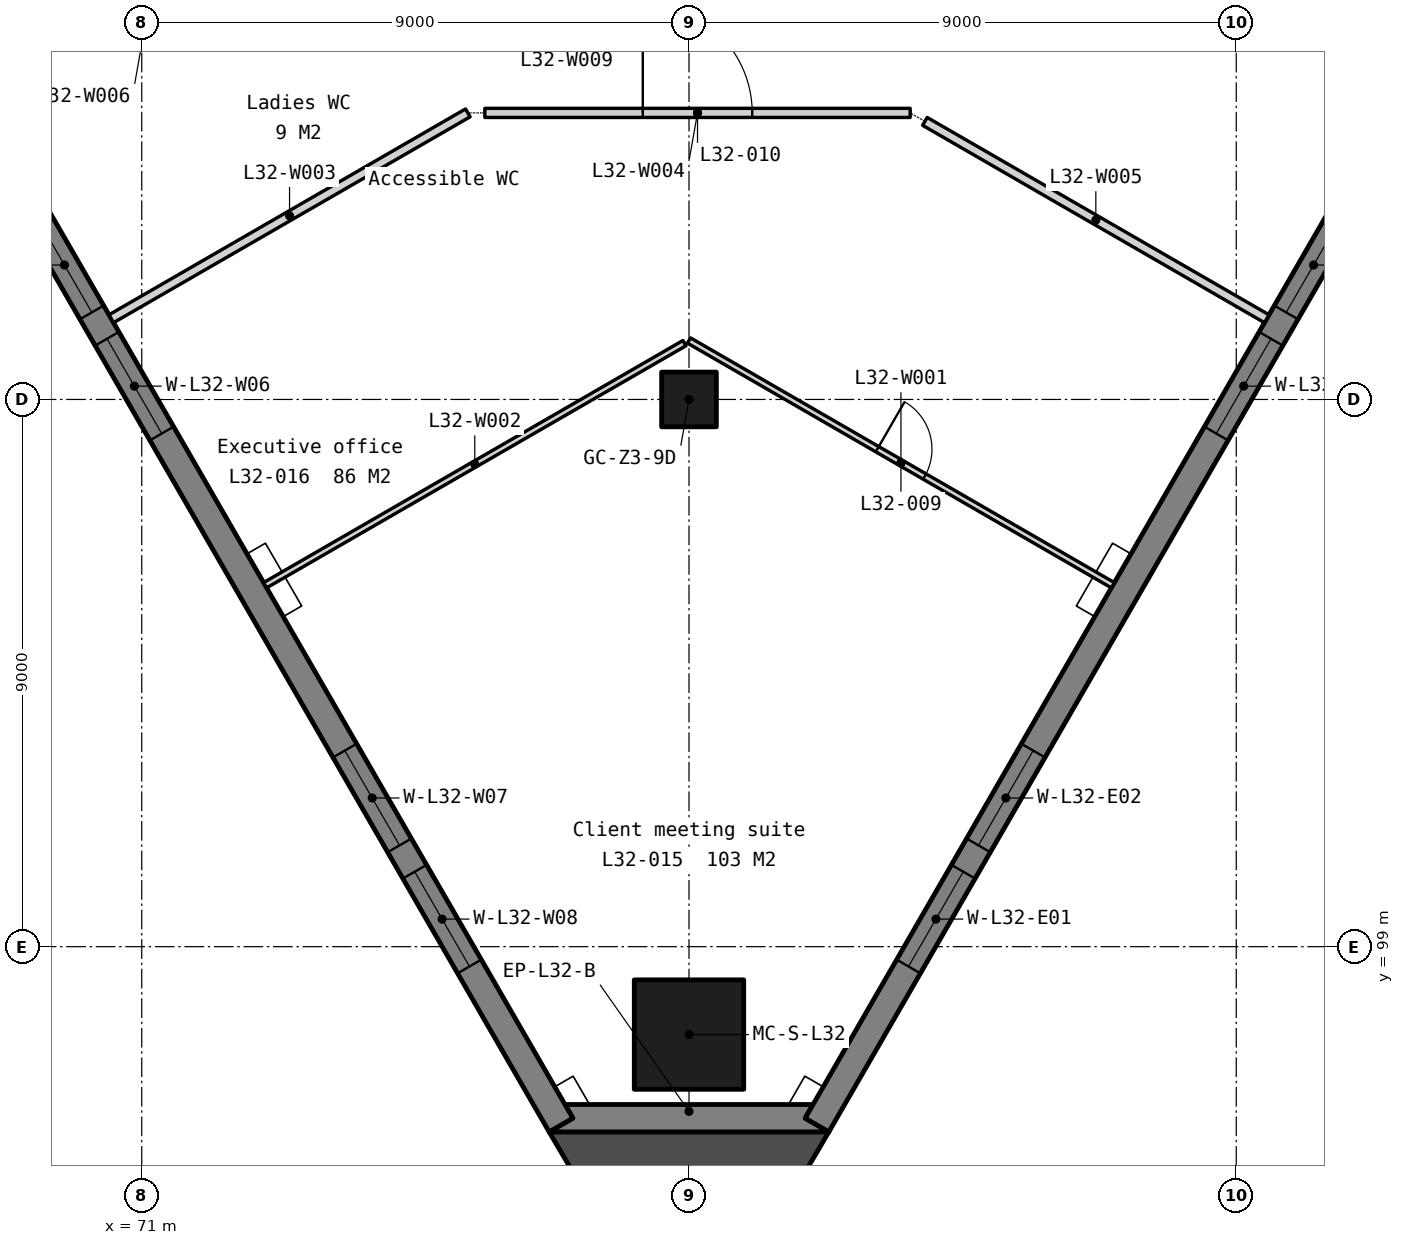
"""IFC4 building model, lengths in metres.
Left out: names, types, materials, properties, quantities, classifications, styles, units other than length and angle.
Written with IfcOpenShell. Run it as: python <this file> out.ifc"""

import sys

from ifc_helpers import new_model, si_unit, direction, frame, frame_2d, origin, origin_2d, place, context, subcontext, project, spatial, polyline, rectangle, outline, extrude, element, fill, save


model = new_model("IFC4")
c1 = context("Model", 3, precision=1e-05, world=origin(), true_north=direction((0.0, 1.0)))
c2 = subcontext(c1, "Body", "Model", "MODEL_VIEW")
j1 = project(units=[si_unit("LENGTHUNIT", "METRE"), si_unit("PLANEANGLEUNIT", "RADIAN")], contexts=[c1])
p1 = place(None, origin())
s1 = spatial("IfcSite", under=j1, at=p1, CompositionType="ELEMENT")
p2 = place(p1, origin())
s2 = spatial("IfcBuilding", under=s1, at=p2, CompositionType="ELEMENT")
p3 = place(p2, frame((0.0, 0.0, 128.6)))
s3 = spatial("IfcBuildingStorey", under=s2, at=p3, CompositionType="ELEMENT", Elevation=128.6)
p4 = place(p3, frame((80.0, 108.0, 0.0), z_axis=(0.0, 0.0, 1.0), x_axis=(1.0, 0.0, 0.0)))
e1 = element("IfcColumn", 1, at=p4, inside=s3, PredefinedType="COLUMN", context=c2, shape_type="SweptSolid", body=[
    extrude(rectangle(XDim=0.9, YDim=0.9, at=origin_2d()), origin(), (0.0, 0.0, 1.0), 3.9),
])
p5 = place(p3, frame((80.0, 97.554, 0.0), z_axis=(0.0, 0.0, 1.0), x_axis=(1.0, 0.0, 0.0)))
e2 = element("IfcColumn", 2, at=p5, inside=s3, PredefinedType="COLUMN", context=c2, shape_type="SweptSolid", body=[
    extrude(rectangle(XDim=1.8, YDim=1.8, at=origin_2d()), origin(), (0.0, 0.0, 1.0), 3.9),
])
p6 = place(p3, frame((0.0, 0.0, -0.45)))
e3 = element("IfcWall", 3, at=p6, inside=s3, PredefinedType="SOLIDWALL", context=c2, shape_type="SweptSolid", body=[
    extrude(outline(polyline([(77.7, 95.954), (78.09, 96.179), (77.96, 96.404), (82.04, 96.404), (81.91, 96.179), (82.3, 95.954), (77.7, 95.954)])), origin(), (0.0, 0.0, 1.0), 4.2),
])
p7 = place(p3, frame((57.652, 131.129, -0.45), z_axis=(0.0, 0.0, 1.0), x_axis=(0.499997369791, -0.866026922331, 0.0)))
e4 = element("IfcWall", 4, at=p7, inside=s3, PredefinedType="SOLIDWALL", context=c2, shape_type="SweptSolid", body=[
    extrude(outline(polyline([(40.486, 0.0), (40.486, 4.2), (0.0, 4.2), (0.0, 0.0), (40.486, 0.0)])), frame((0.0, 0.225, 0.0), z_axis=(0.0, -1.0, 0.0), x_axis=(1.0, 0.0, 0.0)), (0.0, 0.0, 1.0), 0.45),
])
p8 = place(p7, frame((3.011, 0.0, 1.25)))
e5 = element("IfcOpeningElement", 5, at=p8, cuts=e4, PredefinedType="OPENING", context=c2, shape_type="SweptSolid", body=[
    extrude(rectangle(XDim=1.8, YDim=2.2, at=frame_2d((0.9, 1.1))), frame((0.0, 0.235, 0.0), z_axis=(0.0, -1.0, 0.0), x_axis=(1.0, 0.0, 0.0)), (0.0, 0.0, 1.0), 0.47),
])
p9 = place(p7, frame((5.311, 0.0, 1.25)))
e6 = element("IfcOpeningElement", 6, at=p9, cuts=e4, PredefinedType="OPENING", context=c2, shape_type="SweptSolid", body=[
    extrude(rectangle(XDim=1.8, YDim=2.2, at=frame_2d((0.9, 1.1))), frame((0.0, 0.235, 0.0), z_axis=(0.0, -1.0, 0.0), x_axis=(1.0, 0.0, 0.0)), (0.0, 0.0, 1.0), 0.47),
])
p10 = place(p7, frame((13.132, 0.0, 1.25)))
e7 = element("IfcOpeningElement", 7, at=p10, cuts=e4, PredefinedType="OPENING", context=c2, shape_type="SweptSolid", body=[
    extrude(rectangle(XDim=1.8, YDim=2.2, at=frame_2d((0.9, 1.1))), frame((0.0, 0.235, 0.0), z_axis=(0.0, -1.0, 0.0), x_axis=(1.0, 0.0, 0.0)), (0.0, 0.0, 1.0), 0.47),
])
p11 = place(p7, frame((15.432, 0.0, 1.25)))
e8 = element("IfcOpeningElement", 8, at=p11, cuts=e4, PredefinedType="OPENING", context=c2, shape_type="SweptSolid", body=[
    extrude(rectangle(XDim=1.8, YDim=2.2, at=frame_2d((0.9, 1.1))), frame((0.0, 0.235, 0.0), z_axis=(0.0, -1.0, 0.0), x_axis=(1.0, 0.0, 0.0)), (0.0, 0.0, 1.0), 0.47),
])
p12 = place(p7, frame((23.254, 0.0, 1.25)))
e9 = element("IfcOpeningElement", 9, at=p12, cuts=e4, PredefinedType="OPENING", context=c2, shape_type="SweptSolid", body=[
    extrude(rectangle(XDim=1.8, YDim=2.2, at=frame_2d((0.9, 1.1))), frame((0.0, 0.235, 0.0), z_axis=(0.0, -1.0, 0.0), x_axis=(1.0, 0.0, 0.0)), (0.0, 0.0, 1.0), 0.47),
])
p13 = place(p7, frame((25.554, 0.0, 1.25)))
e10 = element("IfcOpeningElement", 10, at=p13, cuts=e4, PredefinedType="OPENING", context=c2, shape_type="SweptSolid", body=[
    extrude(rectangle(XDim=1.8, YDim=2.2, at=frame_2d((0.9, 1.1))), frame((0.0, 0.235, 0.0), z_axis=(0.0, -1.0, 0.0), x_axis=(1.0, 0.0, 0.0)), (0.0, 0.0, 1.0), 0.47),
])
p14 = place(p7, frame((33.375, 0.0, 1.25)))
e11 = element("IfcOpeningElement", 11, at=p14, cuts=e4, PredefinedType="OPENING", context=c2, shape_type="SweptSolid", body=[
    extrude(rectangle(XDim=1.8, YDim=2.2, at=frame_2d((0.9, 1.1))), frame((0.0, 0.235, 0.0), z_axis=(0.0, -1.0, 0.0), x_axis=(1.0, 0.0, 0.0)), (0.0, 0.0, 1.0), 0.47),
])
p15 = place(p7, frame((35.675, 0.0, 1.25)))
e12 = element("IfcOpeningElement", 12, at=p15, cuts=e4, PredefinedType="OPENING", context=c2, shape_type="SweptSolid", body=[
    extrude(rectangle(XDim=1.8, YDim=2.2, at=frame_2d((0.9, 1.1))), frame((0.0, 0.235, 0.0), z_axis=(0.0, -1.0, 0.0), x_axis=(1.0, 0.0, 0.0)), (0.0, 0.0, 1.0), 0.47),
])
p16 = place(p3, frame((82.105, 96.067, -0.45), z_axis=(0.0, 0.0, 1.0), x_axis=(0.499997369791, 0.866026922331, 0.0)))
e13 = element("IfcWall", 13, at=p16, inside=s3, PredefinedType="SOLIDWALL", context=c2, shape_type="SweptSolid", body=[
    extrude(outline(polyline([(40.486, 0.0), (40.486, 4.2), (0.0, 4.2), (0.0, 0.0), (40.486, 0.0)])), frame((0.0, 0.225, 0.0), z_axis=(0.0, -1.0, 0.0), x_axis=(1.0, 0.0, 0.0)), (0.0, 0.0, 1.0), 0.45),
])
p17 = place(p16, frame((3.011, 0.0, 1.25)))
e14 = element("IfcOpeningElement", 14, at=p17, cuts=e13, PredefinedType="OPENING", context=c2, shape_type="SweptSolid", body=[
    extrude(rectangle(XDim=1.8, YDim=2.2, at=frame_2d((0.9, 1.1))), frame((0.0, 0.235, 0.0), z_axis=(0.0, -1.0, 0.0), x_axis=(1.0, 0.0, 0.0)), (0.0, 0.0, 1.0), 0.47),
])
p18 = place(p16, frame((5.311, 0.0, 1.25)))
e15 = element("IfcOpeningElement", 15, at=p18, cuts=e13, PredefinedType="OPENING", context=c2, shape_type="SweptSolid", body=[
    extrude(rectangle(XDim=1.8, YDim=2.2, at=frame_2d((0.9, 1.1))), frame((0.0, 0.235, 0.0), z_axis=(0.0, -1.0, 0.0), x_axis=(1.0, 0.0, 0.0)), (0.0, 0.0, 1.0), 0.47),
])
p19 = place(p16, frame((13.132, 0.0, 1.25)))
e16 = element("IfcOpeningElement", 16, at=p19, cuts=e13, PredefinedType="OPENING", context=c2, shape_type="SweptSolid", body=[
    extrude(rectangle(XDim=1.8, YDim=2.2, at=frame_2d((0.9, 1.1))), frame((0.0, 0.235, 0.0), z_axis=(0.0, -1.0, 0.0), x_axis=(1.0, 0.0, 0.0)), (0.0, 0.0, 1.0), 0.47),
])
p20 = place(p16, frame((15.432, 0.0, 1.25)))
e17 = element("IfcOpeningElement", 17, at=p20, cuts=e13, PredefinedType="OPENING", context=c2, shape_type="SweptSolid", body=[
    extrude(rectangle(XDim=1.8, YDim=2.2, at=frame_2d((0.9, 1.1))), frame((0.0, 0.235, 0.0), z_axis=(0.0, -1.0, 0.0), x_axis=(1.0, 0.0, 0.0)), (0.0, 0.0, 1.0), 0.47),
])
p21 = place(p16, frame((23.254, 0.0, 1.25)))
e18 = element("IfcOpeningElement", 18, at=p21, cuts=e13, PredefinedType="OPENING", context=c2, shape_type="SweptSolid", body=[
    extrude(rectangle(XDim=1.8, YDim=2.2, at=frame_2d((0.9, 1.1))), frame((0.0, 0.235, 0.0), z_axis=(0.0, -1.0, 0.0), x_axis=(1.0, 0.0, 0.0)), (0.0, 0.0, 1.0), 0.47),
])
p22 = place(p16, frame((25.554, 0.0, 1.25)))
e19 = element("IfcOpeningElement", 19, at=p22, cuts=e13, PredefinedType="OPENING", context=c2, shape_type="SweptSolid", body=[
    extrude(rectangle(XDim=1.8, YDim=2.2, at=frame_2d((0.9, 1.1))), frame((0.0, 0.235, 0.0), z_axis=(0.0, -1.0, 0.0), x_axis=(1.0, 0.0, 0.0)), (0.0, 0.0, 1.0), 0.47),
])
p23 = place(p16, frame((33.375, 0.0, 1.25)))
e20 = element("IfcOpeningElement", 20, at=p23, cuts=e13, PredefinedType="OPENING", context=c2, shape_type="SweptSolid", body=[
    extrude(rectangle(XDim=1.8, YDim=2.2, at=frame_2d((0.9, 1.1))), frame((0.0, 0.235, 0.0), z_axis=(0.0, -1.0, 0.0), x_axis=(1.0, 0.0, 0.0)), (0.0, 0.0, 1.0), 0.47),
])
p24 = place(p16, frame((35.675, 0.0, 1.25)))
e21 = element("IfcOpeningElement", 21, at=p24, cuts=e13, PredefinedType="OPENING", context=c2, shape_type="SweptSolid", body=[
    extrude(rectangle(XDim=1.8, YDim=2.2, at=frame_2d((0.9, 1.1))), frame((0.0, 0.235, 0.0), z_axis=(0.0, -1.0, 0.0), x_axis=(1.0, 0.0, 0.0)), (0.0, 0.0, 1.0), 0.47),
])
p25 = place(p3, frame((0.0, 0.0, -0.45)))
e22 = element("IfcWall", 22, at=p25, inside=s3, PredefinedType="SOLIDWALL", context=c2, shape_type="SweptSolid", body=[
    extrude(outline(polyline([(77.7, 95.954), (80.0, 92.051), (82.3, 95.954), (77.7, 95.954)])), origin(), (0.0, 0.0, 1.0), 4.2),
])
p26 = place(p3, frame((80.0, 108.969, 0.0), z_axis=(0.0, 0.0, 1.0), x_axis=(0.86602648383, -0.499998129301, 0.0)))
e23 = element("IfcWall", 23, at=p26, inside=s3, PredefinedType="PARTITIONING", context=c2, shape_type="SweptSolid", body=[
    extrude(rectangle(XDim=8.049, YDim=0.1, at=frame_2d((4.025, 0.0))), origin(), (0.0, 0.0, 1.0), 3.75),
])
p27 = place(p26, frame((3.575, 0.0, 0.0)))
e24 = element("IfcOpeningElement", 24, at=p27, cuts=e23, PredefinedType="OPENING", context=c2, shape_type="SweptSolid", body=[
    extrude(rectangle(XDim=0.9, YDim=2.1, at=frame_2d((0.45, 1.05))), frame((0.0, 0.06, 0.0), z_axis=(0.0, -1.0, 0.0), x_axis=(1.0, 0.0, 0.0)), (0.0, 0.0, 1.0), 0.12),
])
p28 = place(p3, frame((73.029, 104.945, 0.0), z_axis=(0.0, 0.0, 1.0), x_axis=(0.866023222546, 0.500003777996, 0.0)))
e25 = element("IfcWall", 25, at=p28, inside=s3, PredefinedType="PARTITIONING", context=c2, shape_type="SweptSolid", body=[
    extrude(rectangle(XDim=7.963, YDim=0.1, at=frame_2d((3.981, 0.0))), origin(), (0.0, 0.0, 1.0), 3.75),
])
p29 = place(p3, frame((70.499, 109.327, 0.0), z_axis=(0.0, 0.0, 1.0), x_axis=(0.866024677295, 0.500001258315, 0.0)))
e26 = element("IfcWall", 26, at=p29, inside=s3, PredefinedType="PARTITIONING", context=c2, shape_type="SweptSolid", body=[
    extrude(rectangle(XDim=6.771, YDim=0.15, at=frame_2d((3.386, 0.0))), origin(), (0.0, 0.0, 1.0), 3.75),
])
p30 = place(p3, frame((76.643, 112.713, 0.0), z_axis=(0.0, 0.0, 1.0), x_axis=(1.0, 0.0, 0.0)))
e27 = element("IfcWall", 27, at=p30, inside=s3, PredefinedType="PARTITIONING", context=c2, shape_type="SweptSolid", body=[
    extrude(rectangle(XDim=6.995, YDim=0.15, at=frame_2d((3.497, 0.0))), origin(), (0.0, 0.0, 1.0), 3.75),
])
p31 = place(p30, frame((2.597, 0.0, 0.0)))
e28 = element("IfcOpeningElement", 28, at=p31, cuts=e27, PredefinedType="OPENING", context=c2, shape_type="SweptSolid", body=[
    extrude(rectangle(XDim=1.8, YDim=2.1, at=frame_2d((0.9, 1.05))), frame((0.0, 0.085, 0.0), z_axis=(0.0, -1.0, 0.0), x_axis=(1.0, 0.0, 0.0)), (0.0, 0.0, 1.0), 0.17),
])
p32 = place(p3, frame((83.88, 112.573, 0.0), z_axis=(0.0, 0.0, 1.0), x_axis=(0.866019616786, -0.500010023241, 0.0)))
e29 = element("IfcWall", 29, at=p32, inside=s3, PredefinedType="PARTITIONING", context=c2, shape_type="SweptSolid", body=[
    extrude(rectangle(XDim=6.491, YDim=0.15, at=frame_2d((3.246, 0.0))), origin(), (0.0, 0.0, 1.0), 3.75),
])
p33 = place(p12, origin())
e30 = element("IfcWindow", 30, at=p33, inside=s3, PartitioningType="SINGLE_PANEL", PredefinedType="WINDOW", context=c2, shape_type="SweptSolid", body=[
    extrude(rectangle(XDim=1.8, YDim=2.2, at=frame_2d((0.9, 1.1))), frame((0.0, 0.03, 0.0), z_axis=(0.0, -1.0, 0.0), x_axis=(1.0, 0.0, 0.0)), (0.0, 0.0, 1.0), 0.06),
])
fill(e9, e30)
p34 = place(p13, origin())
e31 = element("IfcWindow", 31, at=p34, inside=s3, PartitioningType="SINGLE_PANEL", PredefinedType="WINDOW", context=c2, shape_type="SweptSolid", body=[
    extrude(rectangle(XDim=1.8, YDim=2.2, at=frame_2d((0.9, 1.1))), frame((0.0, 0.03, 0.0), z_axis=(0.0, -1.0, 0.0), x_axis=(1.0, 0.0, 0.0)), (0.0, 0.0, 1.0), 0.06),
])
fill(e10, e31)
p35 = place(p14, origin())
e32 = element("IfcWindow", 32, at=p35, inside=s3, PartitioningType="SINGLE_PANEL", PredefinedType="WINDOW", context=c2, shape_type="SweptSolid", body=[
    extrude(rectangle(XDim=1.8, YDim=2.2, at=frame_2d((0.9, 1.1))), frame((0.0, 0.03, 0.0), z_axis=(0.0, -1.0, 0.0), x_axis=(1.0, 0.0, 0.0)), (0.0, 0.0, 1.0), 0.06),
])
fill(e11, e32)
p36 = place(p15, origin())
e33 = element("IfcWindow", 33, at=p36, inside=s3, PartitioningType="SINGLE_PANEL", PredefinedType="WINDOW", context=c2, shape_type="SweptSolid", body=[
    extrude(rectangle(XDim=1.8, YDim=2.2, at=frame_2d((0.9, 1.1))), frame((0.0, 0.03, 0.0), z_axis=(0.0, -1.0, 0.0), x_axis=(1.0, 0.0, 0.0)), (0.0, 0.0, 1.0), 0.06),
])
fill(e12, e33)
p37 = place(p17, origin())
e34 = element("IfcWindow", 34, at=p37, inside=s3, PartitioningType="SINGLE_PANEL", PredefinedType="WINDOW", context=c2, shape_type="SweptSolid", body=[
    extrude(rectangle(XDim=1.8, YDim=2.2, at=frame_2d((0.9, 1.1))), frame((0.0, 0.03, 0.0), z_axis=(0.0, -1.0, 0.0), x_axis=(1.0, 0.0, 0.0)), (0.0, 0.0, 1.0), 0.06),
])
fill(e14, e34)
p38 = place(p18, origin())
e35 = element("IfcWindow", 35, at=p38, inside=s3, PartitioningType="SINGLE_PANEL", PredefinedType="WINDOW", context=c2, shape_type="SweptSolid", body=[
    extrude(rectangle(XDim=1.8, YDim=2.2, at=frame_2d((0.9, 1.1))), frame((0.0, 0.03, 0.0), z_axis=(0.0, -1.0, 0.0), x_axis=(1.0, 0.0, 0.0)), (0.0, 0.0, 1.0), 0.06),
])
fill(e15, e35)
p39 = place(p19, origin())
e36 = element("IfcWindow", 36, at=p39, inside=s3, PartitioningType="SINGLE_PANEL", PredefinedType="WINDOW", context=c2, shape_type="SweptSolid", body=[
    extrude(rectangle(XDim=1.8, YDim=2.2, at=frame_2d((0.9, 1.1))), frame((0.0, 0.03, 0.0), z_axis=(0.0, -1.0, 0.0), x_axis=(1.0, 0.0, 0.0)), (0.0, 0.0, 1.0), 0.06),
])
fill(e16, e36)
p40 = place(p20, origin())
e37 = element("IfcWindow", 37, at=p40, inside=s3, PartitioningType="SINGLE_PANEL", PredefinedType="WINDOW", context=c2, shape_type="SweptSolid", body=[
    extrude(rectangle(XDim=1.8, YDim=2.2, at=frame_2d((0.9, 1.1))), frame((0.0, 0.03, 0.0), z_axis=(0.0, -1.0, 0.0), x_axis=(1.0, 0.0, 0.0)), (0.0, 0.0, 1.0), 0.06),
])
fill(e17, e37)
p41 = place(p27, origin())
e38 = element("IfcDoor", 38, at=p41, inside=s3, OperationType="SINGLE_SWING_LEFT", PredefinedType="DOOR", context=c2, shape_type="SweptSolid", body=[
    extrude(rectangle(XDim=0.9, YDim=2.1, at=frame_2d((0.45, 1.05))), frame((0.0, 0.025, 0.0), z_axis=(0.0, -1.0, 0.0), x_axis=(1.0, 0.0, 0.0)), (0.0, 0.0, 1.0), 0.05),
])
fill(e24, e38)
p42 = place(p31, origin())
e39 = element("IfcDoor", 39, at=p42, inside=s3, OperationType="SINGLE_SWING_LEFT", PredefinedType="DOOR", context=c2, shape_type="SweptSolid", body=[
    extrude(rectangle(XDim=1.8, YDim=2.1, at=frame_2d((0.9, 1.05))), frame((0.0, 0.025, 0.0), z_axis=(0.0, -1.0, 0.0), x_axis=(1.0, 0.0, 0.0)), (0.0, 0.0, 1.0), 0.05),
])
fill(e28, e39)
save(model, sys.argv[1])
